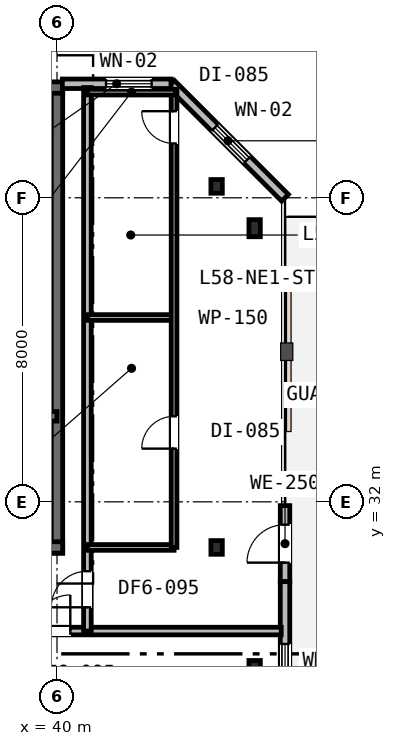
"""IFC4 building model, lengths in metres.
Left out: names, types, materials, properties, quantities, classifications, styles, units other than length and angle.
Written with IfcOpenShell. Run it as: python <this file> out.ifc"""

import sys

from ifc_helpers import new_model, si_unit, direction, frame, frame_2d, origin, origin_2d, place, context, subcontext, project, spatial, rectangle, i_section, extrude, element, fill, save


model = new_model("IFC4")
c1 = context("Model", 3, precision=1e-05, world=origin(), true_north=direction((0.0, 1.0)))
c2 = subcontext(c1, "Body", "Model", "MODEL_VIEW")
j1 = project(units=[si_unit("LENGTHUNIT", "METRE"), si_unit("PLANEANGLEUNIT", "RADIAN")], contexts=[c1])
p1 = place(None, origin())
s1 = spatial("IfcSite", under=j1, at=p1, CompositionType="ELEMENT")
p2 = place(p1, origin())
s2 = spatial("IfcBuilding", under=s1, at=p2, CompositionType="ELEMENT")
p3 = place(p2, frame((0.0, 0.0, 226.0)))
s3 = spatial("IfcBuildingStorey", under=s2, at=p3, CompositionType="ELEMENT", Elevation=226.0)
p4 = place(p3, frame((40.0, 30.65, 0.0), z_axis=(0.0, 0.0, 1.0), x_axis=(0.0, 1.0, 0.0)))
e1 = element("IfcWall", 1, at=p4, inside=s3, PredefinedType="SHEAR", context=c2, shape_type="SweptSolid", body=[
    extrude(rectangle(XDim=12.3, YDim=0.3, at=frame_2d((6.15, 0.0))), origin(), (0.0, 0.0, 1.0), 3.8),
])
p5 = place(p3, frame((15.85, 42.9, 0.0), z_axis=(0.0, 0.0, 1.0), x_axis=(1.0, 0.0, 0.0)))
e2 = element("IfcWall", 2, at=p5, inside=s3, PredefinedType="SHEAR", context=c2, shape_type="SweptSolid", body=[
    extrude(rectangle(XDim=24.3, YDim=0.3, at=frame_2d((12.15, 0.0))), origin(), (0.0, 0.0, 1.0), 3.8),
])
p6 = place(p3, frame((28.95, 30.8, 0.0), z_axis=(0.0, 0.0, 1.0), x_axis=(1.0, 0.0, 0.0)))
e3 = element("IfcWall", 3, at=p6, inside=s3, PredefinedType="SHEAR", context=c2, shape_type="SweptSolid", body=[
    extrude(rectangle(XDim=11.2, YDim=0.3, at=frame_2d((5.6, 0.0))), origin(), (0.0, 0.0, 1.0), 3.8),
])
p7 = place(p6, frame((7.65, 0.0, 0.0)))
e4 = element("IfcOpeningElement", 4, at=p7, cuts=e3, PredefinedType="OPENING", context=c2, shape_type="SweptSolid", body=[
    extrude(rectangle(XDim=1.1, YDim=2.15, at=frame_2d((0.55, 1.075))), frame((0.0, 0.16, 0.0), z_axis=(0.0, -1.0, 0.0), x_axis=(1.0, 0.0, 0.0)), (0.0, 0.0, 1.0), 0.32),
])
p8 = place(p3, frame((33.95, 34.25, 0.0), z_axis=(0.0, 0.0, 1.0), x_axis=(1.0, 0.0, 0.0)))
e5 = element("IfcWall", 5, at=p8, inside=s3, PredefinedType="SHEAR", context=c2, shape_type="SweptSolid", body=[
    extrude(rectangle(XDim=6.05, YDim=0.25, at=frame_2d((3.025, 0.0))), origin(), (0.0, 0.0, 1.0), 3.8),
])
p9 = place(p8, frame((3.7, 0.0, 0.0)))
e6 = element("IfcOpeningElement", 6, at=p9, cuts=e5, PredefinedType="OPENING", context=c2, shape_type="SweptSolid", body=[
    extrude(rectangle(XDim=1.0, YDim=2.15, at=frame_2d((0.5, 1.075))), frame((0.0, 0.135, 0.0), z_axis=(0.0, -1.0, 0.0), x_axis=(1.0, 0.0, 0.0)), (0.0, 0.0, 1.0), 0.27),
])
p10 = place(p8, frame((0.55, 0.0, 0.0)))
e7 = element("IfcOpeningElement", 7, at=p10, cuts=e5, PredefinedType="OPENING", context=c2, shape_type="SweptSolid", body=[
    extrude(rectangle(XDim=1.1, YDim=2.15, at=frame_2d((0.55, 1.075))), frame((0.0, 0.135, 0.0), z_axis=(0.0, -1.0, 0.0), x_axis=(1.0, 0.0, 0.0)), (0.0, 0.0, 1.0), 0.27),
])
for number, where, z_axis, x_axis in (
    (8, (45.2, 27.6, 0.0), (0.0, 0.0, 1.0), (1.0, 0.0, 0.0)),
    (9, (45.2, 39.2, 0.0), (0.0, 0.0, 1.0), (1.0, 0.0, 0.0)),
):
    element("IfcColumn", number, at=place(p3, frame(where, z_axis=z_axis, x_axis=x_axis)), inside=s3, PredefinedType="COLUMN", context=c2, shape_type="SweptSolid", body=[
        extrude(i_section(OverallWidth=0.3, OverallDepth=0.45, WebThickness=0.014, FlangeThickness=0.026, FilletRadius=0.027, at=origin_2d()), origin(), (0.0, 0.0, 1.0), 3.8),
    ])
for number, where, z_axis, x_axis in (
    (10, (44.2, 30.8, 0.0), (0.0, 0.0, 1.0), (1.0, 0.0, 0.0)),
    (11, (44.2, 40.3, 0.0), (0.0, 0.0, 1.0), (1.0, 0.0, 0.0)),
):
    element("IfcColumn", number, at=place(p3, frame(where, z_axis=z_axis, x_axis=x_axis)), inside=s3, PredefinedType="COLUMN", context=c2, shape_type="SweptSolid", body=[
        extrude(i_section(OverallWidth=0.3, OverallDepth=0.36, WebThickness=0.013, FlangeThickness=0.022, FilletRadius=0.027, at=origin_2d()), origin(), (0.0, 0.0, 1.0), 3.8),
    ])
p11 = place(p3, frame((46.0, 29.9, 0.0), z_axis=(0.0, 0.0, 1.0), x_axis=(0.0, 1.0, 0.0)))
e12 = element("IfcWall", 12, at=p11, inside=s3, PredefinedType="STANDARD", context=c2, shape_type="SweptSolid", body=[
    extrude(rectangle(XDim=2.0, YDim=0.25, at=frame_2d((1.0, 0.0))), origin(), (0.0, 0.0, 1.0), 3.53),
])
p12 = place(p11, frame((0.5, 0.0, 0.0)))
e13 = element("IfcOpeningElement", 13, at=p12, cuts=e12, PredefinedType="OPENING", context=c2, shape_type="SweptSolid", body=[
    extrude(rectangle(XDim=1.0, YDim=2.15, at=frame_2d((0.5, 1.075))), frame((0.0, 0.135, 0.0), z_axis=(0.0, -1.0, 0.0), x_axis=(1.0, 0.0, 0.0)), (0.0, 0.0, 1.0), 0.27),
])
p13 = place(p3, frame((46.0, 27.0, 0.0), z_axis=(0.0, 0.0, 1.0), x_axis=(0.0, 1.0, 0.0)))
e14 = element("IfcWall", 14, at=p13, inside=s3, PredefinedType="STANDARD", context=c2, shape_type="SweptSolid", body=[
    extrude(rectangle(XDim=2.9, YDim=0.25, at=frame_2d((1.45, 0.0))), origin(), (0.0, 0.0, 1.0), 3.53),
])
p14 = place(p13, frame((0.36, 0.0, 0.9)))
e15 = element("IfcOpeningElement", 15, at=p14, cuts=e14, PredefinedType="OPENING", context=c2, shape_type="SweptSolid", body=[
    extrude(rectangle(XDim=0.9, YDim=1.55, at=frame_2d((0.45, 0.775))), frame((0.0, 0.135, 0.0), z_axis=(0.0, -1.0, 0.0), x_axis=(1.0, 0.0, 0.0)), (0.0, 0.0, 1.0), 0.27),
])
p15 = place(p3, frame((46.0, 40.0, 0.0), z_axis=(0.0, 0.0, 1.0), x_axis=(-0.707106781187, 0.707106781187, 0.0)))
e16 = element("IfcWall", 16, at=p15, inside=s3, PredefinedType="STANDARD", context=c2, shape_type="SweptSolid", body=[
    extrude(rectangle(XDim=4.243, YDim=0.25, at=frame_2d((2.121, 0.0))), origin(), (0.0, 0.0, 1.0), 3.53),
])
p16 = place(p15, frame((1.411, 0.0, 0.85)))
e17 = element("IfcOpeningElement", 17, at=p16, cuts=e16, PredefinedType="OPENING", context=c2, shape_type="SweptSolid", body=[
    extrude(rectangle(XDim=1.2, YDim=1.6, at=frame_2d((0.6, 0.8))), frame((0.0, 0.135, 0.0), z_axis=(0.0, -1.0, 0.0), x_axis=(1.0, 0.0, 0.0)), (0.0, 0.0, 1.0), 0.27),
])
p17 = place(p3, frame((43.0, 43.0, 0.0), z_axis=(0.0, 0.0, 1.0), x_axis=(-1.0, 0.0, 0.0)))
e18 = element("IfcWall", 18, at=p17, inside=s3, PredefinedType="STANDARD", context=c2, shape_type="SweptSolid", body=[
    extrude(rectangle(XDim=2.86, YDim=0.25, at=frame_2d((1.43, 0.0))), origin(), (0.0, 0.0, 1.0), 3.53),
])
p18 = place(p17, frame((0.51, 0.0, 0.85)))
e19 = element("IfcOpeningElement", 19, at=p18, cuts=e18, PredefinedType="OPENING", context=c2, shape_type="SweptSolid", body=[
    extrude(rectangle(XDim=1.2, YDim=1.6, at=frame_2d((0.6, 0.8))), frame((0.0, 0.135, 0.0), z_axis=(0.0, -1.0, 0.0), x_axis=(1.0, 0.0, 0.0)), (0.0, 0.0, 1.0), 0.27),
])
p19 = place(p3, frame((13.6, 28.6, 0.0), z_axis=(0.0, 0.0, 1.0), x_axis=(1.0, 0.0, 0.0)))
e20 = element("IfcWall", 20, at=p19, inside=s3, PredefinedType="PARTITIONING", context=c2, shape_type="SweptSolid", body=[
    extrude(rectangle(XDim=32.3, YDim=0.2, at=frame_2d((16.15, 0.0))), origin(), (0.0, 0.0, 1.0), 2.92),
])
p20 = place(p19, frame((11.787, 0.0, 0.0)))
e21 = element("IfcOpeningElement", 21, at=p20, cuts=e20, PredefinedType="OPENING", context=c2, shape_type="SweptSolid", body=[
    extrude(rectangle(XDim=0.95, YDim=2.15, at=frame_2d((0.475, 1.075))), frame((0.0, 0.11, 0.0), z_axis=(0.0, -1.0, 0.0), x_axis=(1.0, 0.0, 0.0)), (0.0, 0.0, 1.0), 0.22),
])
p21 = place(p19, frame((25.8, 0.0, 0.0)))
e22 = element("IfcOpeningElement", 22, at=p21, cuts=e20, PredefinedType="OPENING", context=c2, shape_type="SweptSolid", body=[
    extrude(rectangle(XDim=0.95, YDim=2.15, at=frame_2d((0.475, 1.075))), frame((0.0, 0.11, 0.0), z_axis=(0.0, -1.0, 0.0), x_axis=(1.0, 0.0, 0.0)), (0.0, 0.0, 1.0), 0.22),
])
p22 = place(p3, frame((40.8, 28.6, 0.0), z_axis=(0.0, 0.0, 1.0), x_axis=(0.0, 1.0, 0.0)))
e23 = element("IfcWall", 23, at=p22, inside=s3, PredefinedType="PARTITIONING", context=c2, shape_type="SweptSolid", body=[
    extrude(rectangle(XDim=14.3, YDim=0.2, at=frame_2d((7.15, 0.0))), origin(), (0.0, 0.0, 1.0), 2.92),
])
p23 = place(p22, frame((0.625, 0.0, 0.0)))
e24 = element("IfcOpeningElement", 24, at=p23, cuts=e23, PredefinedType="OPENING", context=c2, shape_type="SweptSolid", body=[
    extrude(rectangle(XDim=0.95, YDim=2.15, at=frame_2d((0.475, 1.075))), frame((0.0, 0.11, 0.0), z_axis=(0.0, -1.0, 0.0), x_axis=(1.0, 0.0, 0.0)), (0.0, 0.0, 1.0), 0.22),
])
p24 = place(p3, frame((40.8, 30.8, 0.0), z_axis=(0.0, 0.0, 1.0), x_axis=(1.0, 0.0, 0.0)))
e25 = element("IfcWall", 25, at=p24, inside=s3, PredefinedType="PARTITIONING", context=c2, shape_type="SweptSolid", body=[
    extrude(rectangle(XDim=2.28, YDim=0.15, at=frame_2d((1.14, 0.0))), origin(), (0.0, 0.0, 1.0), 2.92),
])
p25 = place(p3, frame((40.8, 36.85, 0.0), z_axis=(0.0, 0.0, 1.0), x_axis=(1.0, 0.0, 0.0)))
e26 = element("IfcWall", 26, at=p25, inside=s3, PredefinedType="PARTITIONING", context=c2, shape_type="SweptSolid", body=[
    extrude(rectangle(XDim=2.28, YDim=0.15, at=frame_2d((1.14, 0.0))), origin(), (0.0, 0.0, 1.0), 3.53),
])
p26 = place(p3, frame((43.08, 30.8, 0.0), z_axis=(0.0, 0.0, 1.0), x_axis=(0.0, 1.0, 0.0)))
e27 = element("IfcWall", 27, at=p26, inside=s3, PredefinedType="PARTITIONING", context=c2, shape_type="SweptSolid", body=[
    extrude(rectangle(XDim=12.02, YDim=0.15, at=frame_2d((6.01, 0.0))), origin(), (0.0, 0.0, 1.0), 2.92),
])
p27 = place(p26, frame((2.6, 0.0, 0.0)))
e28 = element("IfcOpeningElement", 28, at=p27, cuts=e27, PredefinedType="OPENING", context=c2, shape_type="SweptSolid", body=[
    extrude(rectangle(XDim=0.85, YDim=2.15, at=frame_2d((0.425, 1.075))), frame((0.0, 0.085, 0.0), z_axis=(0.0, -1.0, 0.0), x_axis=(1.0, 0.0, 0.0)), (0.0, 0.0, 1.0), 0.17),
])
p28 = place(p26, frame((10.629, 0.0, 0.0)))
e29 = element("IfcOpeningElement", 29, at=p28, cuts=e27, PredefinedType="OPENING", context=c2, shape_type="SweptSolid", body=[
    extrude(rectangle(XDim=0.85, YDim=2.15, at=frame_2d((0.425, 1.075))), frame((0.0, 0.085, 0.0), z_axis=(0.0, -1.0, 0.0), x_axis=(1.0, 0.0, 0.0)), (0.0, 0.0, 1.0), 0.17),
])
p29 = place(p3, frame((40.8, 42.78, 0.0), z_axis=(0.0, 0.0, 1.0), x_axis=(1.0, 0.0, 0.0)))
e30 = element("IfcWall", 30, at=p29, inside=s3, PredefinedType="PARTITIONING", context=c2, shape_type="SweptSolid", body=[
    extrude(rectangle(XDim=2.32, YDim=0.15, at=frame_2d((1.16, 0.0))), origin(), (0.0, 0.0, 1.0), 3.53),
])
p30 = place(p12, origin())
e31 = element("IfcDoor", 31, at=p30, inside=s3, OperationType="SINGLE_SWING_LEFT", PredefinedType="DOOR", context=c2, shape_type="SweptSolid", body=[
    extrude(rectangle(XDim=1.0, YDim=2.15, at=frame_2d((0.5, 1.075))), frame((0.0, 0.025, 0.0), z_axis=(0.0, -1.0, 0.0), x_axis=(1.0, 0.0, 0.0)), (0.0, 0.0, 1.0), 0.05),
])
fill(e13, e31)
p31 = place(p14, origin())
e32 = element("IfcWindow", 32, at=p31, inside=s3, PartitioningType="SINGLE_PANEL", PredefinedType="WINDOW", context=c2, shape_type="SweptSolid", body=[
    extrude(rectangle(XDim=0.9, YDim=1.55, at=frame_2d((0.45, 0.775))), frame((0.0, 0.03, 0.0), z_axis=(0.0, -1.0, 0.0), x_axis=(1.0, 0.0, 0.0)), (0.0, 0.0, 1.0), 0.06),
])
fill(e15, e32)
p32 = place(p16, origin())
e33 = element("IfcWindow", 33, at=p32, inside=s3, PartitioningType="SINGLE_PANEL", PredefinedType="WINDOW", context=c2, shape_type="SweptSolid", body=[
    extrude(rectangle(XDim=1.2, YDim=1.6, at=frame_2d((0.6, 0.8))), frame((0.0, 0.03, 0.0), z_axis=(0.0, -1.0, 0.0), x_axis=(1.0, 0.0, 0.0)), (0.0, 0.0, 1.0), 0.06),
])
fill(e17, e33)
p33 = place(p18, origin())
e34 = element("IfcWindow", 34, at=p33, inside=s3, PartitioningType="SINGLE_PANEL", PredefinedType="WINDOW", context=c2, shape_type="SweptSolid", body=[
    extrude(rectangle(XDim=1.2, YDim=1.6, at=frame_2d((0.6, 0.8))), frame((0.0, 0.03, 0.0), z_axis=(0.0, -1.0, 0.0), x_axis=(1.0, 0.0, 0.0)), (0.0, 0.0, 1.0), 0.06),
])
fill(e19, e34)
p34 = place(p23, origin())
e35 = element("IfcDoor", 35, at=p34, inside=s3, OperationType="SINGLE_SWING_LEFT", PredefinedType="DOOR", context=c2, shape_type="SweptSolid", body=[
    extrude(rectangle(XDim=0.95, YDim=2.15, at=frame_2d((0.475, 1.075))), frame((0.0, 0.025, 0.0), z_axis=(0.0, -1.0, 0.0), x_axis=(1.0, 0.0, 0.0)), (0.0, 0.0, 1.0), 0.05),
])
fill(e24, e35)
p35 = place(p27, origin())
e36 = element("IfcDoor", 36, at=p35, inside=s3, OperationType="SINGLE_SWING_LEFT", PredefinedType="DOOR", context=c2, shape_type="SweptSolid", body=[
    extrude(rectangle(XDim=0.85, YDim=2.15, at=frame_2d((0.425, 1.075))), frame((0.0, 0.025, 0.0), z_axis=(0.0, -1.0, 0.0), x_axis=(1.0, 0.0, 0.0)), (0.0, 0.0, 1.0), 0.05),
])
fill(e28, e36)
p36 = place(p28, origin())
e37 = element("IfcDoor", 37, at=p36, inside=s3, OperationType="SINGLE_SWING_RIGHT", PredefinedType="DOOR", context=c2, shape_type="SweptSolid", body=[
    extrude(rectangle(XDim=0.85, YDim=2.15, at=frame_2d((0.425, 1.075))), frame((0.0, 0.025, 0.0), z_axis=(0.0, -1.0, 0.0), x_axis=(1.0, 0.0, 0.0)), (0.0, 0.0, 1.0), 0.05),
])
fill(e29, e37)
p37 = place(p21, origin())
e38 = element("IfcDoor", 38, at=p37, inside=s3, OperationType="SINGLE_SWING_RIGHT", PredefinedType="DOOR", context=c2, shape_type="SweptSolid", body=[
    extrude(rectangle(XDim=0.95, YDim=2.15, at=frame_2d((0.475, 1.075))), frame((0.0, 0.025, 0.0), z_axis=(0.0, -1.0, 0.0), x_axis=(1.0, 0.0, 0.0)), (0.0, 0.0, 1.0), 0.05),
])
fill(e22, e38)
save(model, sys.argv[1])
